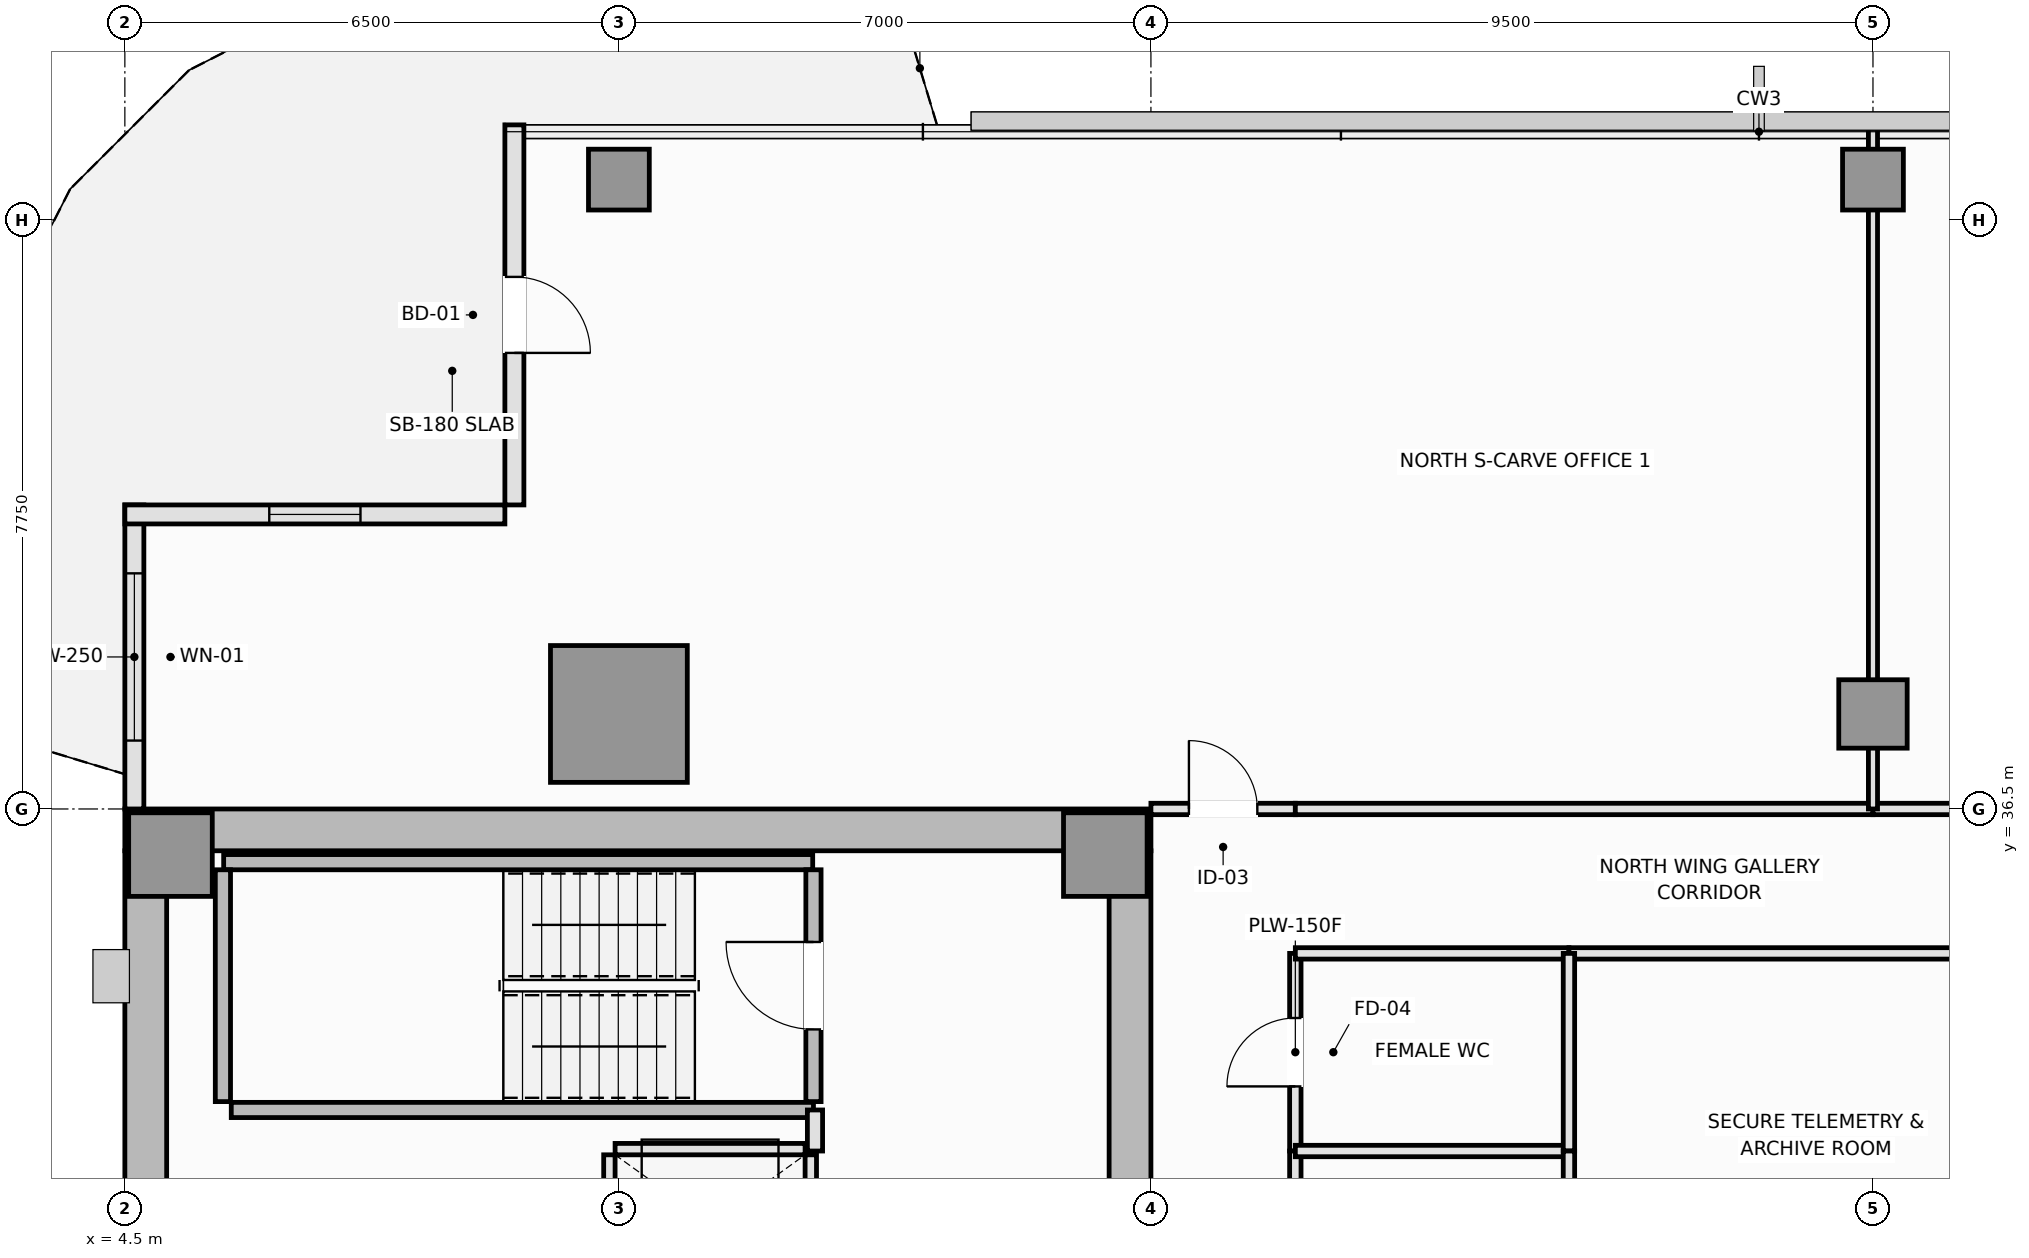
"""IFC4 building model, lengths in metres.
Left out: names, types, materials, properties, quantities, classifications, styles, units other than length and angle.
Written with IfcOpenShell. Run it as: python <this file> out.ifc"""

import sys

from ifc_helpers import new_model, si_unit, direction, frame, frame_2d, origin, origin_2d, place, context, subcontext, project, spatial, rectangle, extrude, element, fill, save


model = new_model("IFC4")
c1 = context("Model", 3, precision=1e-05, world=origin(), true_north=direction((0.0, 1.0)))
c2 = subcontext(c1, "Body", "Model", "MODEL_VIEW")
j1 = project(units=[si_unit("LENGTHUNIT", "METRE"), si_unit("PLANEANGLEUNIT", "RADIAN")], contexts=[c1])
p1 = place(None, origin())
s1 = spatial("IfcSite", under=j1, at=p1, CompositionType="ELEMENT")
p2 = place(p1, origin())
s2 = spatial("IfcBuilding", under=s1, at=p2, CompositionType="ELEMENT")
p3 = place(p2, frame((0.0, 0.0, 188.05)))
s3 = spatial("IfcBuildingStorey", under=s2, at=p3, CompositionType="ELEMENT", Elevation=188.05)
p4 = place(p3, frame((4.5, 36.225, 0.0), z_axis=(0.0, 0.0, 1.0), x_axis=(1.0, 0.0, 0.0)))
e1 = element("IfcWall", 1, at=p4, inside=s3, PredefinedType="SHEAR", context=c2, shape_type="SweptSolid", body=[
    extrude(rectangle(XDim=13.5, YDim=0.55, at=frame_2d((6.75, 0.0))), origin(), (0.0, 0.0, 1.0), 3.55),
])
p5 = place(p3, frame((4.775, 14.55, 0.0), z_axis=(0.0, 0.0, 1.0), x_axis=(0.0, 1.0, 0.0)))
e2 = element("IfcWall", 2, at=p5, inside=s3, PredefinedType="SHEAR", context=c2, shape_type="SweptSolid", body=[
    extrude(rectangle(XDim=21.4, YDim=0.55, at=frame_2d((10.7, 0.0))), origin(), (0.0, 0.0, 1.0), 3.55),
])
p6 = place(p3, frame((17.725, 27.05, 0.0), z_axis=(0.0, 0.0, 1.0), x_axis=(0.0, 1.0, 0.0)))
e3 = element("IfcWall", 3, at=p6, inside=s3, PredefinedType="SHEAR", context=c2, shape_type="SweptSolid", body=[
    extrude(rectangle(XDim=8.9, YDim=0.55, at=frame_2d((4.45, 0.0))), origin(), (0.0, 0.0, 1.0), 3.55),
])
p7 = place(p6, frame((3.45, 0.0, 0.0)))
e4 = element("IfcOpeningElement", 4, at=p7, cuts=e3, PredefinedType="OPENING", context=c2, shape_type="SweptSolid", body=[
    extrude(rectangle(XDim=1.1, YDim=2.15, at=frame_2d((0.55, 1.075))), frame((0.0, 0.285, 0.0), z_axis=(0.0, -1.0, 0.0), x_axis=(1.0, 0.0, 0.0)), (0.0, 0.0, 1.0), 0.57),
])
for number, where, z_axis, x_axis in (
    (5, (5.1, 35.9, 0.0), (0.0, 0.0, 1.0), (1.0, 0.0, 0.0)),
    (6, (17.4, 35.9, 0.0), (0.0, 0.0, 1.0), (1.0, 0.0, 0.0)),
):
    element("IfcColumn", number, at=place(p3, frame(where, z_axis=z_axis, x_axis=x_axis)), inside=s3, PredefinedType="PILASTER", context=c2, shape_type="SweptSolid", body=[
        extrude(rectangle(XDim=1.1, YDim=1.1, at=origin_2d()), origin(), (0.0, 0.0, 1.0), 3.55),
    ])
p8 = place(p3, frame((11.0, 37.75, 0.0), z_axis=(0.0, 0.0, 1.0), x_axis=(1.0, 0.0, 0.0)))
e7 = element("IfcColumn", 7, at=p8, inside=s3, PredefinedType="COLUMN", context=c2, shape_type="SweptSolid", body=[
    extrude(rectangle(XDim=1.8, YDim=1.8, at=origin_2d()), origin(), (0.0, 0.0, 1.0), 3.55),
])
p9 = place(p3, frame((27.5, 37.75, 0.0), z_axis=(0.0, 0.0, 1.0), x_axis=(1.0, 0.0, 0.0)))
e8 = element("IfcColumn", 8, at=p9, inside=s3, PredefinedType="COLUMN", context=c2, shape_type="SweptSolid", body=[
    extrude(rectangle(XDim=0.9, YDim=0.9, at=origin_2d()), origin(), (0.0, 0.0, 1.0), 3.55),
])
for number, where, z_axis, x_axis in (
    (9, (11.0, 44.78, 0.0), (0.0, 0.0, 1.0), (1.0, 0.0, 0.0)),
    (10, (27.5, 44.78, 0.0), (0.0, 0.0, 1.0), (1.0, 0.0, 0.0)),
):
    element("IfcColumn", number, at=place(p3, frame(where, z_axis=z_axis, x_axis=x_axis)), inside=s3, PredefinedType="COLUMN", context=c2, shape_type="SweptSolid", body=[
        extrude(rectangle(XDim=0.8, YDim=0.8, at=origin_2d()), origin(), (0.0, 0.0, 1.0), 3.55),
    ])
p10 = place(p3, frame((4.625, 40.5, 0.0), z_axis=(0.0, 0.0, 1.0), x_axis=(0.0, -1.0, 0.0)))
e11 = element("IfcWall", 11, at=p10, inside=s3, PredefinedType="SOLIDWALL", context=c2, shape_type="SweptSolid", body=[
    extrude(rectangle(XDim=4.0, YDim=0.25, at=frame_2d((2.0, 0.0))), origin(), (0.0, 0.0, 1.0), 3.37),
])
p11 = place(p10, frame((0.9, 0.0, 0.9)))
e12 = element("IfcOpeningElement", 12, at=p11, cuts=e11, PredefinedType="OPENING", context=c2, shape_type="SweptSolid", body=[
    extrude(rectangle(XDim=2.2, YDim=1.8, at=frame_2d((1.1, 0.9))), frame((0.0, 0.135, 0.0), z_axis=(0.0, -1.0, 0.0), x_axis=(1.0, 0.0, 0.0)), (0.0, 0.0, 1.0), 0.27),
])
p12 = place(p3, frame((9.625, 45.5, 0.0), z_axis=(0.0, 0.0, 1.0), x_axis=(0.0, -1.0, 0.0)))
e13 = element("IfcWall", 13, at=p12, inside=s3, PredefinedType="SOLIDWALL", context=c2, shape_type="SweptSolid", body=[
    extrude(rectangle(XDim=5.0, YDim=0.25, at=frame_2d((2.5, 0.0))), origin(), (0.0, 0.0, 1.0), 3.1),
])
p13 = place(p12, frame((2.0, 0.0, 0.0)))
e14 = element("IfcOpeningElement", 14, at=p13, cuts=e13, PredefinedType="OPENING", context=c2, shape_type="SweptSolid", body=[
    extrude(rectangle(XDim=1.0, YDim=2.2, at=frame_2d((0.5, 1.1))), frame((0.0, 0.135, 0.0), z_axis=(0.0, -1.0, 0.0), x_axis=(1.0, 0.0, 0.0)), (0.0, 0.0, 1.0), 0.27),
])
p14 = place(p3, frame((9.5, 40.375, 0.0), z_axis=(0.0, 0.0, 1.0), x_axis=(-1.0, 0.0, 0.0)))
e15 = element("IfcWall", 15, at=p14, inside=s3, PredefinedType="SOLIDWALL", context=c2, shape_type="SweptSolid", body=[
    extrude(rectangle(XDim=5.0, YDim=0.25, at=frame_2d((2.5, 0.0))), origin(), (0.0, 0.0, 1.0), 3.37),
])
p15 = place(p14, frame((1.9, 0.0, 0.9)))
e16 = element("IfcOpeningElement", 16, at=p15, cuts=e15, PredefinedType="OPENING", context=c2, shape_type="SweptSolid", body=[
    extrude(rectangle(XDim=1.2, YDim=1.8, at=frame_2d((0.6, 0.9))), frame((0.0, 0.135, 0.0), z_axis=(0.0, -1.0, 0.0), x_axis=(1.0, 0.0, 0.0)), (0.0, 0.0, 1.0), 0.27),
])
p16 = place(p3, frame((5.8, 35.8, 0.0), z_axis=(0.0, 0.0, 1.0), x_axis=(1.0, 0.0, 0.0)))
e17 = element("IfcWall", 17, at=p16, inside=s3, PredefinedType="SOLIDWALL", context=c2, shape_type="SweptSolid", body=[
    extrude(rectangle(XDim=7.75, YDim=0.2, at=frame_2d((3.875, 0.0))), origin(), (0.0, 0.0, 1.0), 3.55),
])
p17 = place(p3, frame((5.79, 32.65, 0.0), z_axis=(0.0, 0.0, 1.0), x_axis=(0.0, 1.0, 0.0)))
e18 = element("IfcWall", 18, at=p17, inside=s3, PredefinedType="SOLIDWALL", context=c2, shape_type="SweptSolid", body=[
    extrude(rectangle(XDim=3.05, YDim=0.2, at=frame_2d((1.525, 0.0))), origin(), (0.0, 0.0, 1.0), 3.55),
])
p18 = place(p3, frame((5.9, 32.54, 0.0), z_axis=(0.0, 0.0, 1.0), x_axis=(1.0, 0.0, 0.0)))
e19 = element("IfcWall", 19, at=p18, inside=s3, PredefinedType="SOLIDWALL", context=c2, shape_type="SweptSolid", body=[
    extrude(rectangle(XDim=7.66, YDim=0.2, at=frame_2d((3.83, 0.0))), origin(), (0.0, 0.0, 1.0), 3.55),
])
p19 = place(p3, frame((13.56, 32.65, 0.0), z_axis=(0.0, 0.0, 1.0), x_axis=(0.0, 1.0, 0.0)))
e20 = element("IfcWall", 20, at=p19, inside=s3, PredefinedType="SOLIDWALL", context=c2, shape_type="SweptSolid", body=[
    extrude(rectangle(XDim=3.05, YDim=0.2, at=frame_2d((1.525, 0.0))), origin(), (0.0, 0.0, 1.0), 3.55),
])
p20 = place(p19, frame((0.95, 0.0, 0.0)))
e21 = element("IfcOpeningElement", 21, at=p20, cuts=e20, PredefinedType="OPENING", context=c2, shape_type="SweptSolid", body=[
    extrude(rectangle(XDim=1.15, YDim=2.15, at=frame_2d((0.575, 1.075))), frame((0.0, 0.11, 0.0), z_axis=(0.0, -1.0, 0.0), x_axis=(1.0, 0.0, 0.0)), (0.0, 0.0, 1.0), 0.22),
])
p21 = place(p3, frame((10.95, 32.025, 0.0), z_axis=(0.0, 0.0, 1.0), x_axis=(1.0, 0.0, 0.0)))
e22 = element("IfcWall", 22, at=p21, inside=s3, PredefinedType="PARTITIONING", context=c2, shape_type="SweptSolid", body=[
    extrude(rectangle(XDim=2.5, YDim=0.15, at=frame_2d((1.25, 0.0))), origin(), (0.0, 0.0, 1.0), 3.37),
])
p22 = place(p3, frame((10.875, 30.15, 0.0), z_axis=(0.0, 0.0, 1.0), x_axis=(0.0, 1.0, 0.0)))
e23 = element("IfcWall", 23, at=p22, inside=s3, PredefinedType="PARTITIONING", context=c2, shape_type="SweptSolid", body=[
    extrude(rectangle(XDim=1.8, YDim=0.15, at=frame_2d((0.9, 0.0))), origin(), (0.0, 0.0, 1.0), 3.37),
])
p23 = place(p3, frame((13.525, 30.15, 0.0), z_axis=(0.0, 0.0, 1.0), x_axis=(0.0, 1.0, 0.0)))
e24 = element("IfcWall", 24, at=p23, inside=s3, PredefinedType="PARTITIONING", context=c2, shape_type="SweptSolid", body=[
    extrude(rectangle(XDim=1.8, YDim=0.15, at=frame_2d((0.9, 0.0))), origin(), (0.0, 0.0, 1.0), 3.37),
])
p24 = place(p23, frame((0.35, 0.0, 0.0)))
e25 = element("IfcOpeningElement", 25, at=p24, cuts=e24, PredefinedType="OPENING", context=c2, shape_type="SweptSolid", body=[
    extrude(rectangle(XDim=1.1, YDim=2.2, at=frame_2d((0.55, 1.1))), frame((0.0, 0.085, 0.0), z_axis=(0.0, -1.0, 0.0), x_axis=(1.0, 0.0, 0.0)), (0.0, 0.0, 1.0), 0.17),
])
p25 = place(p3, frame((13.58, 32.0, 0.0), z_axis=(0.0, 0.0, 1.0), x_axis=(0.0, 1.0, 0.0)))
e26 = element("IfcWall", 26, at=p25, inside=s3, PredefinedType="PARTITIONING", context=c2, shape_type="SweptSolid", body=[
    extrude(rectangle(XDim=0.54, YDim=0.2, at=frame_2d((0.27, 0.0))), origin(), (0.0, 0.0, 1.0), 3.37),
])
p26 = place(p3, frame((19.9, 32.0, 0.0), z_axis=(0.0, 0.0, 1.0), x_axis=(0.0, 1.0, 0.0)))
e27 = element("IfcWall", 27, at=p26, inside=s3, PredefinedType="PLUMBINGWALL", context=c2, shape_type="SweptSolid", body=[
    extrude(rectangle(XDim=2.6, YDim=0.15, at=frame_2d((1.3, 0.0))), origin(), (0.0, 0.0, 1.0), 3.37),
])
p27 = place(p26, frame((0.85, 0.0, 0.0)))
e28 = element("IfcOpeningElement", 28, at=p27, cuts=e27, PredefinedType="OPENING", context=c2, shape_type="SweptSolid", body=[
    extrude(rectangle(XDim=0.9, YDim=2.1, at=frame_2d((0.45, 1.05))), frame((0.0, 0.085, 0.0), z_axis=(0.0, -1.0, 0.0), x_axis=(1.0, 0.0, 0.0)), (0.0, 0.0, 1.0), 0.17),
])
p28 = place(p3, frame((19.9, 29.9, 0.0), z_axis=(0.0, 0.0, 1.0), x_axis=(0.0, 1.0, 0.0)))
e29 = element("IfcWall", 29, at=p28, inside=s3, PredefinedType="PLUMBINGWALL", context=c2, shape_type="SweptSolid", body=[
    extrude(rectangle(XDim=2.1, YDim=0.15, at=frame_2d((1.05, 0.0))), origin(), (0.0, 0.0, 1.0), 3.37),
])
p29 = place(p28, frame((0.6, 0.0, 0.0)))
e30 = element("IfcOpeningElement", 30, at=p29, cuts=e29, PredefinedType="OPENING", context=c2, shape_type="SweptSolid", body=[
    extrude(rectangle(XDim=0.9, YDim=2.1, at=frame_2d((0.45, 1.05))), frame((0.0, 0.085, 0.0), z_axis=(0.0, -1.0, 0.0), x_axis=(1.0, 0.0, 0.0)), (0.0, 0.0, 1.0), 0.17),
])
p30 = place(p3, frame((18.0, 36.5, 0.0), z_axis=(0.0, 0.0, 1.0), x_axis=(1.0, 0.0, 0.0)))
e31 = element("IfcWall", 31, at=p30, inside=s3, PredefinedType="PARTITIONING", context=c2, shape_type="SweptSolid", body=[
    extrude(rectangle(XDim=1.9, YDim=0.15, at=frame_2d((0.95, 0.0))), origin(), (0.0, 0.0, 1.0), 3.37),
])
p31 = place(p30, frame((0.5, 0.0, 0.0)))
e32 = element("IfcOpeningElement", 32, at=p31, cuts=e31, PredefinedType="OPENING", context=c2, shape_type="SweptSolid", body=[
    extrude(rectangle(XDim=0.9, YDim=2.1, at=frame_2d((0.45, 1.05))), frame((0.0, 0.085, 0.0), z_axis=(0.0, -1.0, 0.0), x_axis=(1.0, 0.0, 0.0)), (0.0, 0.0, 1.0), 0.17),
])
p32 = place(p3, frame((19.9, 34.6, 0.0), z_axis=(0.0, 0.0, 1.0), x_axis=(1.0, 0.0, 0.0)))
e33 = element("IfcWall", 33, at=p32, inside=s3, PredefinedType="PLUMBINGWALL", context=c2, shape_type="SweptSolid", body=[
    extrude(rectangle(XDim=3.6, YDim=0.15, at=frame_2d((1.8, 0.0))), origin(), (0.0, 0.0, 1.0), 3.37),
])
p33 = place(p3, frame((23.5, 34.6, 0.0), z_axis=(0.0, 0.0, 1.0), x_axis=(1.0, 0.0, 0.0)))
e34 = element("IfcWall", 34, at=p33, inside=s3, PredefinedType="PARTITIONING", context=c2, shape_type="SweptSolid", body=[
    extrude(rectangle(XDim=7.3, YDim=0.15, at=frame_2d((3.65, 0.0))), origin(), (0.0, 0.0, 1.0), 3.37),
])
p34 = place(p3, frame((19.9, 36.5, 0.0), z_axis=(0.0, 0.0, 1.0), x_axis=(1.0, 0.0, 0.0)))
e35 = element("IfcWall", 35, at=p34, inside=s3, PredefinedType="PARTITIONING", context=c2, shape_type="SweptSolid", body=[
    extrude(rectangle(XDim=7.6, YDim=0.15, at=frame_2d((3.8, 0.0))), origin(), (0.0, 0.0, 1.0), 3.37),
])
p35 = place(p3, frame((27.5, 36.5, 0.0), z_axis=(0.0, 0.0, 1.0), x_axis=(1.0, 0.0, 0.0)))
e36 = element("IfcWall", 36, at=p35, inside=s3, PredefinedType="PARTITIONING", context=c2, shape_type="SweptSolid", body=[
    extrude(rectangle(XDim=3.3, YDim=0.15, at=frame_2d((1.65, 0.0))), origin(), (0.0, 0.0, 1.0), 3.37),
])
p36 = place(p35, frame((1.15, 0.0, 0.0)))
e37 = element("IfcOpeningElement", 37, at=p36, cuts=e36, PredefinedType="OPENING", context=c2, shape_type="SweptSolid", body=[
    extrude(rectangle(XDim=1.0, YDim=2.15, at=frame_2d((0.5, 1.075))), frame((0.0, 0.085, 0.0), z_axis=(0.0, -1.0, 0.0), x_axis=(1.0, 0.0, 0.0)), (0.0, 0.0, 1.0), 0.17),
])
p37 = place(p3, frame((19.9, 32.0, 0.0), z_axis=(0.0, 0.0, 1.0), x_axis=(1.0, 0.0, 0.0)))
e38 = element("IfcWall", 38, at=p37, inside=s3, PredefinedType="PLUMBINGWALL", context=c2, shape_type="SweptSolid", body=[
    extrude(rectangle(XDim=3.6, YDim=0.15, at=frame_2d((1.8, 0.0))), origin(), (0.0, 0.0, 1.0), 2.87),
])
p38 = place(p3, frame((23.5, 32.0, 0.0), z_axis=(0.0, 0.0, 1.0), x_axis=(0.0, 1.0, 0.0)))
e39 = element("IfcWall", 39, at=p38, inside=s3, PredefinedType="PLUMBINGWALL", context=c2, shape_type="SweptSolid", body=[
    extrude(rectangle(XDim=2.6, YDim=0.15, at=frame_2d((1.3, 0.0))), origin(), (0.0, 0.0, 1.0), 3.37),
])
p39 = place(p3, frame((23.5, 29.9, 0.0), z_axis=(0.0, 0.0, 1.0), x_axis=(0.0, 1.0, 0.0)))
e40 = element("IfcWall", 40, at=p39, inside=s3, PredefinedType="PLUMBINGWALL", context=c2, shape_type="SweptSolid", body=[
    extrude(rectangle(XDim=2.1, YDim=0.15, at=frame_2d((1.05, 0.0))), origin(), (0.0, 0.0, 1.0), 3.37),
])
p40 = place(p3, frame((27.5, 36.5, 0.0), z_axis=(0.0, 0.0, 1.0), x_axis=(0.0, 1.0, 0.0)))
e41 = element("IfcWall", 41, at=p40, inside=s3, PredefinedType="PARTITIONING", context=c2, shape_type="SweptSolid", body=[
    extrude(rectangle(XDim=8.99, YDim=0.12, at=frame_2d((4.495, 0.0))), origin(), (0.0, 0.0, 1.0), 2.92),
])
p41 = place(p11, origin())
e42 = element("IfcWindow", 42, at=p41, inside=s3, PartitioningType="SINGLE_PANEL", PredefinedType="WINDOW", context=c2, shape_type="SweptSolid", body=[
    extrude(rectangle(XDim=2.2, YDim=1.8, at=frame_2d((1.1, 0.9))), frame((0.0, 0.03, 0.0), z_axis=(0.0, -1.0, 0.0), x_axis=(1.0, 0.0, 0.0)), (0.0, 0.0, 1.0), 0.06),
])
fill(e12, e42)
p42 = place(p13, frame((1.0, 0.0, 0.0), z_axis=(0.0, 0.0, 1.0), x_axis=(-1.0, 0.0, 0.0)))
e43 = element("IfcDoor", 43, at=p42, inside=s3, OperationType="SINGLE_SWING_RIGHT", PredefinedType="DOOR", context=c2, shape_type="SweptSolid", body=[
    extrude(rectangle(XDim=1.0, YDim=2.2, at=frame_2d((0.5, 1.1))), frame((0.0, 0.025, 0.0), z_axis=(0.0, -1.0, 0.0), x_axis=(1.0, 0.0, 0.0)), (0.0, 0.0, 1.0), 0.05),
])
fill(e14, e43)
p43 = place(p15, origin())
e44 = element("IfcWindow", 44, at=p43, inside=s3, PartitioningType="SINGLE_PANEL", PredefinedType="WINDOW", context=c2, shape_type="SweptSolid", body=[
    extrude(rectangle(XDim=1.2, YDim=1.8, at=frame_2d((0.6, 0.9))), frame((0.0, 0.03, 0.0), z_axis=(0.0, -1.0, 0.0), x_axis=(1.0, 0.0, 0.0)), (0.0, 0.0, 1.0), 0.06),
])
fill(e16, e44)
p44 = place(p20, origin())
e45 = element("IfcDoor", 45, at=p44, inside=s3, OperationType="SINGLE_SWING_RIGHT", PredefinedType="DOOR", context=c2, shape_type="SweptSolid", body=[
    extrude(rectangle(XDim=1.15, YDim=2.15, at=frame_2d((0.575, 1.075))), frame((0.0, 0.025, 0.0), z_axis=(0.0, -1.0, 0.0), x_axis=(1.0, 0.0, 0.0)), (0.0, 0.0, 1.0), 0.05),
])
fill(e21, e45)
p45 = place(p27, origin())
e46 = element("IfcDoor", 46, at=p45, inside=s3, OperationType="SINGLE_SWING_LEFT", PredefinedType="DOOR", context=c2, shape_type="SweptSolid", body=[
    extrude(rectangle(XDim=0.9, YDim=2.1, at=frame_2d((0.45, 1.05))), frame((0.0, 0.025, 0.0), z_axis=(0.0, -1.0, 0.0), x_axis=(1.0, 0.0, 0.0)), (0.0, 0.0, 1.0), 0.05),
])
fill(e28, e46)
p46 = place(p31, origin())
e47 = element("IfcDoor", 47, at=p46, inside=s3, OperationType="SINGLE_SWING_LEFT", PredefinedType="DOOR", context=c2, shape_type="SweptSolid", body=[
    extrude(rectangle(XDim=0.9, YDim=2.1, at=frame_2d((0.45, 1.05))), frame((0.0, 0.025, 0.0), z_axis=(0.0, -1.0, 0.0), x_axis=(1.0, 0.0, 0.0)), (0.0, 0.0, 1.0), 0.05),
])
fill(e32, e47)
save(model, sys.argv[1])
